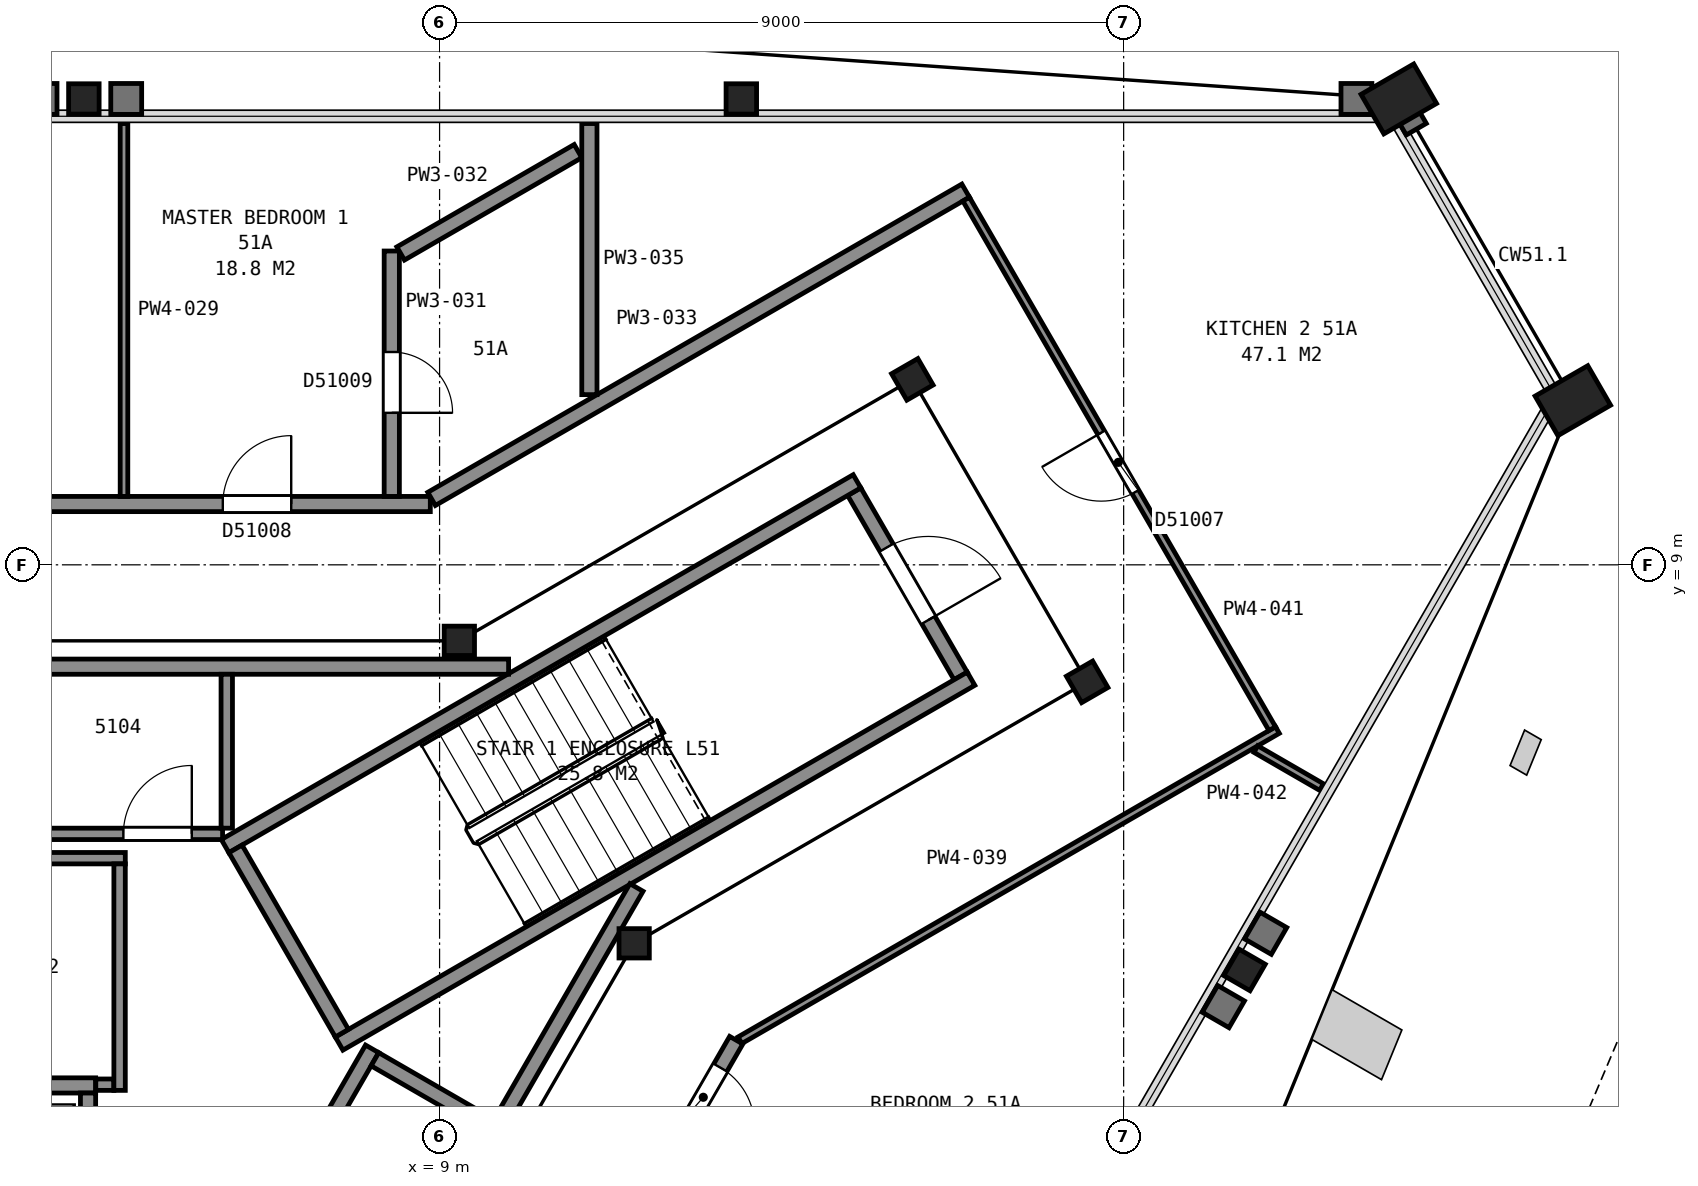
"""IFC4 building model, lengths in metres.
Left out: names, types, materials, properties, quantities, classifications, styles, units other than length and angle.
Written with IfcOpenShell. Run it as: python <this file> out.ifc"""

import sys

from ifc_helpers import new_model, si_unit, direction, frame, frame_2d, origin, origin_2d, place, context, subcontext, project, spatial, rectangle, hollow_rectangle, i_section, extrude, element, fill, save


model = new_model("IFC4")
c1 = context("Model", 3, precision=1e-05, world=origin(), true_north=direction((0.0, 1.0)))
c2 = subcontext(c1, "Body", "Model", "MODEL_VIEW")
j1 = project(units=[si_unit("LENGTHUNIT", "METRE"), si_unit("PLANEANGLEUNIT", "RADIAN")], contexts=[c1])
p1 = place(None, origin())
s1 = spatial("IfcSite", under=j1, at=p1, CompositionType="ELEMENT")
p2 = place(p1, origin())
s2 = spatial("IfcBuilding", under=s1, at=p2, CompositionType="ELEMENT")
p3 = place(p2, frame((0.0, 0.0, 206.4)))
s3 = spatial("IfcBuildingStorey", under=s2, at=p3, CompositionType="ELEMENT", Elevation=206.4)
p4 = place(p3, frame((21.62, 15.13, 0.0), z_axis=(0.0, 0.0, 1.0), x_axis=(0.5, -0.866025403784, 0.0)))
e1 = element("IfcColumn", 1, at=p4, inside=s3, PredefinedType="COLUMN", context=c2, shape_type="SweptSolid", body=[
    extrude(hollow_rectangle(XDim=0.6, YDim=0.8, WallThickness=0.05, at=origin_2d()), origin(), (0.0, 0.0, 1.0), 3.7),
])
for number, where, z_axis, x_axis in (
    (2, (12.97, 15.13, 0.0), (0.0, 0.0, 1.0), (1.0, 0.0, 0.0)),
    (3, (4.32, 15.13, 0.0), (0.0, 0.0, 1.0), (1.0, 0.0, 0.0)),
    (4, (19.59, 3.67, 0.0), (0.0, 0.0, 1.0), (-0.5, -0.866, 0.0)),
):
    element("IfcColumn", number, at=place(p3, frame(where, z_axis=z_axis, x_axis=x_axis)), inside=s3, PredefinedType="COLUMN", context=c2, shape_type="SweptSolid", body=[
        extrude(i_section(OverallWidth=0.401, OverallDepth=0.399, WebThickness=0.025, FlangeThickness=0.04, FilletRadius=0.015, at=origin_2d()), origin(), (0.0, 0.0, 1.0), 3.7),
    ])
p5 = place(p3, frame((23.91, 11.16, 0.0), z_axis=(0.0, 0.0, 1.0), x_axis=(0.5, -0.866025403784, 0.0)))
e5 = element("IfcColumn", 5, at=p5, inside=s3, PredefinedType="COLUMN", context=c2, shape_type="SweptSolid", body=[
    extrude(hollow_rectangle(XDim=0.6, YDim=0.8, WallThickness=0.05, at=origin_2d()), origin(), (0.0, 0.0, 1.0), 3.7),
])
p6 = place(p3, frame((11.56, 4.02, 0.0), z_axis=(0.0, 0.0, 1.0), x_axis=(1.0, 0.0, 0.0)))
e6 = element("IfcColumn", 6, at=p6, inside=s3, PredefinedType="COLUMN", context=c2, shape_type="SweptSolid", body=[
    extrude(i_section(OverallWidth=0.399, OverallDepth=0.386, WebThickness=0.021, FlangeThickness=0.033, FilletRadius=0.015, at=origin_2d()), origin(), (0.0, 0.0, 1.0), 3.7),
])
for number, where, z_axis, x_axis in (
    (7, (17.52, 7.46, 0.0), (0.0, 0.0, 1.0), (0.5, -0.866, 0.0)),
    (8, (15.22, 11.44, 0.0), (0.0, 0.0, 1.0), (0.5, -0.866, 0.0)),
):
    element("IfcColumn", number, at=place(p3, frame(where, z_axis=z_axis, x_axis=x_axis)), inside=s3, PredefinedType="COLUMN", context=c2, shape_type="SweptSolid", body=[
        extrude(i_section(OverallWidth=0.401, OverallDepth=0.399, WebThickness=0.025, FlangeThickness=0.04, FilletRadius=0.015, at=origin_2d()), origin(), (0.0, 0.0, 1.0), 3.7),
    ])
p7 = place(p3, frame((9.26, 8.0, 0.0), z_axis=(0.0, 0.0, 1.0), x_axis=(1.0, 0.0, 0.0)))
e9 = element("IfcColumn", 9, at=p7, inside=s3, PredefinedType="COLUMN", context=c2, shape_type="SweptSolid", body=[
    extrude(i_section(OverallWidth=0.399, OverallDepth=0.386, WebThickness=0.021, FlangeThickness=0.033, FilletRadius=0.015, at=origin_2d()), origin(), (0.0, 0.0, 1.0), 3.7),
])
p8 = place(p3, frame((15.855, 7.538, 0.0), z_axis=(0.0, 0.0, 1.0), x_axis=(-0.500049511043, 0.865996816683, 0.0)))
e10 = element("IfcWall", 10, at=p8, inside=s3, PredefinedType="PARTITIONING", context=c2, shape_type="SweptSolid", body=[
    extrude(rectangle(XDim=2.8, YDim=0.2, at=frame_2d((1.4, 0.0))), origin(), (0.0, 0.0, 1.0), 3.45),
])
p9 = place(p8, frame((0.85, 0.0, 0.0)))
e11 = element("IfcOpeningElement", 11, at=p9, cuts=e10, PredefinedType="OPENING", context=c2, shape_type="SweptSolid", body=[
    extrude(rectangle(XDim=1.1, YDim=2.1, at=frame_2d((0.55, 1.05))), frame((0.0, 0.11, 0.0), z_axis=(0.0, -1.0, 0.0), x_axis=(1.0, 0.0, 0.0)), (0.0, 0.0, 1.0), 0.22),
])
for number, where, z_axis, x_axis in (
    (12, (6.178, 5.299, 0.0), (0.0, 0.0, 1.0), (0.866, 0.5, 0.0)),
    (13, (7.678, 2.701, 0.0), (0.0, 0.0, 1.0), (0.866, 0.5, 0.0)),
):
    element("IfcWall", number, at=place(p3, frame(where, z_axis=z_axis, x_axis=x_axis)), inside=s3, PredefinedType="PARTITIONING", context=c2, shape_type="SweptSolid", body=[
        extrude(rectangle(XDim=9.6, YDim=0.2, at=frame_2d((4.8, 0.0))), origin(), (0.0, 0.0, 1.0), 3.45),
    ])
p10 = place(p3, frame((7.715, 2.838, 0.0), z_axis=(0.0, 0.0, 1.0), x_axis=(-0.500049511043, 0.865996816683, 0.0)))
e14 = element("IfcWall", 14, at=p10, inside=s3, PredefinedType="PARTITIONING", context=c2, shape_type="SweptSolid", body=[
    extrude(rectangle(XDim=2.8, YDim=0.2, at=frame_2d((1.4, 0.0))), origin(), (0.0, 0.0, 1.0), 3.45),
])
p11 = place(p3, frame((1.525, 2.15, 0.0), z_axis=(0.0, 0.0, 1.0), x_axis=(1.0, 0.0, 0.0)))
e15 = element("IfcWall", 15, at=p11, inside=s3, PredefinedType="PARTITIONING", context=c2, shape_type="SweptSolid", body=[
    extrude(rectangle(XDim=2.95, YDim=0.2, at=frame_2d((1.475, 0.0))), origin(), (0.0, 0.0, 1.0), 3.7),
])
p12 = place(p11, frame((0.925, 0.0, 0.0)))
e16 = element("IfcOpeningElement", 16, at=p12, cuts=e15, PredefinedType="OPENING", context=c2, shape_type="SweptSolid", body=[
    extrude(rectangle(XDim=1.1, YDim=2.1, at=frame_2d((0.55, 1.05))), frame((0.0, 0.11, 0.0), z_axis=(0.0, -1.0, 0.0), x_axis=(1.0, 0.0, 0.0)), (0.0, 0.0, 1.0), 0.22),
])
p13 = place(p3, frame((5.663, -1.612, 0.0), z_axis=(0.0, 0.0, 1.0), x_axis=(0.49998122708, 0.866036242063, 0.0)))
e17 = element("IfcWall", 17, at=p13, inside=s3, PredefinedType="PARTITIONING", context=c2, shape_type="SweptSolid", body=[
    extrude(rectangle(XDim=4.9, YDim=0.2, at=frame_2d((2.45, 0.0))), origin(), (0.0, 0.0, 1.0), 3.7),
])
p14 = place(p3, frame((4.375, 0.1, 0.0), z_axis=(0.0, 0.0, 1.0), x_axis=(0.0, 1.0, 0.0)))
e18 = element("IfcWall", 18, at=p14, inside=s3, PredefinedType="PARTITIONING", context=c2, shape_type="SweptSolid", body=[
    extrude(rectangle(XDim=1.95, YDim=0.2, at=frame_2d((0.975, 0.0))), origin(), (0.0, 0.0, 1.0), 3.7),
])
p15 = place(p3, frame((9.665, 1.62, 0.0), z_axis=(0.0, 0.0, 1.0), x_axis=(-0.866002029911, 0.500040482552, 0.0)))
e19 = element("IfcWall", 19, at=p15, inside=s3, PredefinedType="PARTITIONING", context=c2, shape_type="SweptSolid", body=[
    extrude(rectangle(XDim=1.75, YDim=0.2, at=frame_2d((0.875, 0.0))), origin(), (0.0, 0.0, 1.0), 3.7),
])
p16 = place(p3, frame((-3.933, 7.66, 0.0), z_axis=(0.0, 0.0, 1.0), x_axis=(1.0, 0.0, 0.0)))
e20 = element("IfcWall", 20, at=p16, inside=s3, PredefinedType="PARTITIONING", context=c2, shape_type="SweptSolid", body=[
    extrude(rectangle(XDim=13.841, YDim=0.2, at=frame_2d((6.92, 0.0))), origin(), (0.0, 0.0, 1.0), 3.45),
])
p17 = place(p3, frame((-0.245, 5.14, 0.0), z_axis=(0.0, 0.0, 1.0), x_axis=(1.0, 0.0, 0.0)))
e21 = element("IfcWall", 21, at=p17, inside=s3, PredefinedType="PARTITIONING", context=c2, shape_type="SweptSolid", body=[
    extrude(rectangle(XDim=5.11, YDim=0.15, at=frame_2d((2.555, 0.0))), origin(), (0.0, 0.0, 1.0), 3.45),
])
p18 = place(p17, frame((0.175, 0.0, 0.0)))
e22 = element("IfcOpeningElement", 22, at=p18, cuts=e21, PredefinedType="OPENING", context=c2, shape_type="SweptSolid", body=[
    extrude(rectangle(XDim=1.0, YDim=2.1, at=frame_2d((0.5, 1.05))), frame((0.0, 0.085, 0.0), z_axis=(0.0, -1.0, 0.0), x_axis=(1.0, 0.0, 0.0)), (0.0, 0.0, 1.0), 0.17),
])
p19 = place(p3, frame((0.925, 5.46, 0.0), z_axis=(0.0, 0.0, 1.0), x_axis=(1.0, 0.0, 0.0)))
e23 = element("IfcWall", 23, at=p19, inside=s3, PredefinedType="PARTITIONING", context=c2, shape_type="SweptSolid", body=[
    extrude(rectangle(XDim=5.22, YDim=0.15, at=frame_2d((2.61, 0.0))), origin(), (0.0, 0.0, 1.0), 3.45),
])
p20 = place(p19, frame((3.915, 0.0, 0.0)))
e24 = element("IfcOpeningElement", 24, at=p20, cuts=e23, PredefinedType="OPENING", context=c2, shape_type="SweptSolid", body=[
    extrude(rectangle(XDim=0.9, YDim=2.1, at=frame_2d((0.45, 1.05))), frame((0.0, 0.085, 0.0), z_axis=(0.0, -1.0, 0.0), x_axis=(1.0, 0.0, 0.0)), (0.0, 0.0, 1.0), 0.17),
])
p21 = place(p3, frame((4.477, 2.16, 0.0), z_axis=(0.0, 0.0, 1.0), x_axis=(1.0, 0.0, 0.0)))
e25 = element("IfcWall", 25, at=p21, inside=s3, PredefinedType="PARTITIONING", context=c2, shape_type="SweptSolid", body=[
    extrude(rectangle(XDim=0.238, YDim=0.15, at=frame_2d((0.119, 0.0))), origin(), (0.0, 0.0, 1.0), 3.45),
])
p22 = place(p3, frame((4.79, 2.085, 0.0), z_axis=(0.0, 0.0, 1.0), x_axis=(0.0, 1.0, 0.0)))
e26 = element("IfcWall", 26, at=p22, inside=s3, PredefinedType="PARTITIONING", context=c2, shape_type="SweptSolid", body=[
    extrude(rectangle(XDim=2.98, YDim=0.15, at=frame_2d((1.49, 0.0))), origin(), (0.0, 0.0, 1.0), 3.45),
])
p23 = place(p3, frame((6.2, 5.535, 0.0), z_axis=(0.0, 0.0, 1.0), x_axis=(0.0, 1.0, 0.0)))
e27 = element("IfcWall", 27, at=p23, inside=s3, PredefinedType="PARTITIONING", context=c2, shape_type="SweptSolid", body=[
    extrude(rectangle(XDim=2.025, YDim=0.15, at=frame_2d((1.013, 0.0))), origin(), (0.0, 0.0, 1.0), 3.45),
])
p24 = place(p3, frame((9.803, 1.658, 0.0), z_axis=(0.0, 0.0, 1.0), x_axis=(0.499943114462, 0.866058244174, 0.0)))
e28 = element("IfcWall", 28, at=p24, inside=s3, PredefinedType="PARTITIONING", context=c2, shape_type="SweptSolid", body=[
    extrude(rectangle(XDim=3.576, YDim=0.2, at=frame_2d((1.788, 0.0))), origin(), (0.0, 0.0, 1.0), 3.45),
])
p25 = place(p3, frame((-8.828, 9.8, 0.0), z_axis=(0.0, 0.0, 1.0), x_axis=(1.0, 0.0, 0.0)))
e29 = element("IfcWall", 29, at=p25, inside=s3, PredefinedType="PARTITIONING", context=c2, shape_type="SweptSolid", body=[
    extrude(rectangle(XDim=17.706, YDim=0.2, at=frame_2d((8.853, 0.0))), origin(), (0.0, 0.0, 1.0), 2.713),
])
p26 = place(p25, frame((14.976, 0.0, 0.0)))
e30 = element("IfcOpeningElement", 30, at=p26, cuts=e29, PredefinedType="OPENING", context=c2, shape_type="SweptSolid", body=[
    extrude(rectangle(XDim=0.9, YDim=2.1, at=frame_2d((0.45, 1.05))), frame((0.0, 0.11, 0.0), z_axis=(0.0, -1.0, 0.0), x_axis=(1.0, 0.0, 0.0)), (0.0, 0.0, 1.0), 0.22),
])
p27 = place(p25, frame((10.673, 0.0, 0.0)))
e31 = element("IfcOpeningElement", 31, at=p27, cuts=e29, PredefinedType="OPENING", context=c2, shape_type="SweptSolid", body=[
    extrude(rectangle(XDim=0.9, YDim=2.1, at=frame_2d((0.45, 1.05))), frame((0.0, 0.11, 0.0), z_axis=(0.0, -1.0, 0.0), x_axis=(1.0, 0.0, 0.0)), (0.0, 0.0, 1.0), 0.22),
])
p28 = place(p25, frame((5.57, 0.0, 0.0)))
e32 = element("IfcOpeningElement", 32, at=p28, cuts=e29, PredefinedType="OPENING", context=c2, shape_type="SweptSolid", body=[
    extrude(rectangle(XDim=0.9, YDim=2.1, at=frame_2d((0.45, 1.05))), frame((0.0, 0.11, 0.0), z_axis=(0.0, -1.0, 0.0), x_axis=(1.0, 0.0, 0.0)), (0.0, 0.0, 1.0), 0.22),
])
p29 = place(p25, frame((1.3, 0.0, 0.0)))
e33 = element("IfcOpeningElement", 33, at=p29, cuts=e29, PredefinedType="OPENING", context=c2, shape_type="SweptSolid", body=[
    extrude(rectangle(XDim=0.9, YDim=2.1, at=frame_2d((0.45, 1.05))), frame((0.0, 0.11, 0.0), z_axis=(0.0, -1.0, 0.0), x_axis=(1.0, 0.0, 0.0)), (0.0, 0.0, 1.0), 0.22),
])
p30 = place(p3, frame((12.903, 2.745, 0.0), z_axis=(0.0, 0.0, 1.0), x_axis=(-0.499999743747, -0.866025551732, 0.0)))
e34 = element("IfcWall", 34, at=p30, inside=s3, PredefinedType="PARTITIONING", context=c2, shape_type="SweptSolid", body=[
    extrude(rectangle(XDim=17.656, YDim=0.2, at=frame_2d((8.828, 0.0))), origin(), (0.0, 0.0, 1.0), 2.713),
])
p31 = place(p30, frame((12.756, 0.0, 0.0)))
e35 = element("IfcOpeningElement", 35, at=p31, cuts=e34, PredefinedType="OPENING", context=c2, shape_type="SweptSolid", body=[
    extrude(rectangle(XDim=1.2, YDim=2.1, at=frame_2d((0.6, 1.05))), frame((0.0, 0.11, 0.0), z_axis=(0.0, -1.0, 0.0), x_axis=(1.0, 0.0, 0.0)), (0.0, 0.0, 1.0), 0.22),
])
p32 = place(p30, frame((7.044, 0.0, 0.0)))
e36 = element("IfcOpeningElement", 36, at=p32, cuts=e34, PredefinedType="OPENING", context=c2, shape_type="SweptSolid", body=[
    extrude(rectangle(XDim=0.9, YDim=2.1, at=frame_2d((0.45, 1.05))), frame((0.0, 0.11, 0.0), z_axis=(0.0, -1.0, 0.0), x_axis=(1.0, 0.0, 0.0)), (0.0, 0.0, 1.0), 0.22),
])
p33 = place(p30, frame((0.417, 0.0, 0.0)))
e37 = element("IfcOpeningElement", 37, at=p33, cuts=e34, PredefinedType="OPENING", context=c2, shape_type="SweptSolid", body=[
    extrude(rectangle(XDim=0.9, YDim=2.1, at=frame_2d((0.45, 1.05))), frame((0.0, 0.11, 0.0), z_axis=(0.0, -1.0, 0.0), x_axis=(1.0, 0.0, 0.0)), (0.0, 0.0, 1.0), 0.22),
])
p34 = place(p3, frame((4.848, 9.9, 0.0), z_axis=(0.0, 0.0, 1.0), x_axis=(0.0, 1.0, 0.0)))
e38 = element("IfcWall", 38, at=p34, inside=s3, PredefinedType="PARTITIONING", context=c2, shape_type="SweptSolid", body=[
    extrude(rectangle(XDim=4.906, YDim=0.1, at=frame_2d((2.453, 0.0))), origin(), (0.0, 0.0, 1.0), 2.713),
])
p35 = place(p3, frame((8.371, 13.129, 0.0), z_axis=(0.0, 0.0, 1.0), x_axis=(0.0, -1.0, 0.0)))
e39 = element("IfcWall", 39, at=p35, inside=s3, PredefinedType="PARTITIONING", context=c2, shape_type="SweptSolid", body=[
    extrude(rectangle(XDim=3.229, YDim=0.2, at=frame_2d((1.615, 0.0))), origin(), (0.0, 0.0, 1.0), 2.713),
])
p36 = place(p35, frame((1.329, 0.0, 0.0)))
e40 = element("IfcOpeningElement", 40, at=p36, cuts=e39, PredefinedType="OPENING", context=c2, shape_type="SweptSolid", body=[
    extrude(rectangle(XDim=0.8, YDim=2.1, at=frame_2d((0.4, 1.05))), frame((0.0, 0.11, 0.0), z_axis=(0.0, -1.0, 0.0), x_axis=(1.0, 0.0, 0.0)), (0.0, 0.0, 1.0), 0.22),
])
p37 = place(p3, frame((8.488, 13.096, 0.0), z_axis=(0.0, 0.0, 1.0), x_axis=(0.866031650062, 0.499989180974, 0.0)))
e41 = element("IfcWall", 41, at=p37, inside=s3, PredefinedType="PARTITIONING", context=c2, shape_type="SweptSolid", body=[
    extrude(rectangle(XDim=2.694, YDim=0.2, at=frame_2d((1.347, 0.0))), origin(), (0.0, 0.0, 1.0), 2.713),
])
p38 = place(p3, frame((8.895, 9.867, 0.0), z_axis=(0.0, 0.0, 1.0), x_axis=(0.866079355551, 0.499906541154, 0.0)))
e42 = element("IfcWall", 42, at=p38, inside=s3, PredefinedType="PARTITIONING", context=c2, shape_type="SweptSolid", body=[
    extrude(rectangle(XDim=8.113, YDim=0.2, at=frame_2d((4.056, 0.0))), origin(), (0.0, 0.0, 1.0), 2.713),
])
p39 = place(p3, frame((10.971, 11.239, 0.0), z_axis=(0.0, 0.0, 1.0), x_axis=(0.0, 1.0, 0.0)))
e43 = element("IfcWall", 43, at=p39, inside=s3, PredefinedType="PARTITIONING", context=c2, shape_type="SweptSolid", body=[
    extrude(rectangle(XDim=3.567, YDim=0.2, at=frame_2d((1.783, 0.0))), origin(), (0.0, 0.0, 1.0), 2.713),
])
p40 = place(p3, frame((12.952, 2.744, 0.0), z_axis=(0.0, 0.0, 1.0), x_axis=(0.86608949446, 0.499888975259, 0.0)))
e44 = element("IfcWall", 44, at=p40, inside=s3, PredefinedType="PARTITIONING", context=c2, shape_type="SweptSolid", body=[
    extrude(rectangle(XDim=8.165, YDim=0.1, at=frame_2d((4.083, 0.0))), origin(), (0.0, 0.0, 1.0), 2.713),
])
p41 = place(p3, frame((15.928, 13.812, 0.0), z_axis=(0.0, 0.0, 1.0), x_axis=(0.500422653123, -0.865781247337, 0.0)))
e45 = element("IfcWall", 45, at=p41, inside=s3, PredefinedType="PARTITIONING", context=c2, shape_type="SweptSolid", body=[
    extrude(rectangle(XDim=8.047, YDim=0.1, at=frame_2d((4.024, 0.0))), origin(), (0.0, 0.0, 1.0), 2.713),
])
p42 = place(p41, frame((3.55, 0.0, 0.0)))
e46 = element("IfcOpeningElement", 46, at=p42, cuts=e45, PredefinedType="OPENING", context=c2, shape_type="SweptSolid", body=[
    extrude(rectangle(XDim=0.9, YDim=2.1, at=frame_2d((0.45, 1.05))), frame((0.0, 0.06, 0.0), z_axis=(0.0, -1.0, 0.0), x_axis=(1.0, 0.0, 0.0)), (0.0, 0.0, 1.0), 0.12),
])
p43 = place(p3, frame((19.739, 6.576, 0.0), z_axis=(0.0, 0.0, 1.0), x_axis=(0.865855657918, -0.500293893279, 0.0)))
e47 = element("IfcWall", 47, at=p43, inside=s3, PredefinedType="PARTITIONING", context=c2, shape_type="SweptSolid", body=[
    extrude(rectangle(XDim=0.999, YDim=0.1, at=frame_2d((0.499, 0.0))), origin(), (0.0, 0.0, 1.0), 2.713),
])
p44 = place(p9, origin())
e48 = element("IfcDoor", 48, at=p44, inside=s3, OperationType="SINGLE_SWING_LEFT", PredefinedType="DOOR", context=c2, shape_type="SweptSolid", body=[
    extrude(rectangle(XDim=1.1, YDim=2.1, at=frame_2d((0.55, 1.05))), frame((0.0, 0.025, 0.0), z_axis=(0.0, -1.0, 0.0), x_axis=(1.0, 0.0, 0.0)), (0.0, 0.0, 1.0), 0.05),
])
fill(e11, e48)
p45 = place(p20, origin())
e49 = element("IfcDoor", 49, at=p45, inside=s3, OperationType="SINGLE_SWING_RIGHT", PredefinedType="DOOR", context=c2, shape_type="SweptSolid", body=[
    extrude(rectangle(XDim=0.9, YDim=2.1, at=frame_2d((0.45, 1.05))), frame((0.0, 0.025, 0.0), z_axis=(0.0, -1.0, 0.0), x_axis=(1.0, 0.0, 0.0)), (0.0, 0.0, 1.0), 0.05),
])
fill(e24, e49)
p46 = place(p26, origin())
e50 = element("IfcDoor", 50, at=p46, inside=s3, OperationType="SINGLE_SWING_RIGHT", PredefinedType="DOOR", context=c2, shape_type="SweptSolid", body=[
    extrude(rectangle(XDim=0.9, YDim=2.1, at=frame_2d((0.45, 1.05))), frame((0.0, 0.025, 0.0), z_axis=(0.0, -1.0, 0.0), x_axis=(1.0, 0.0, 0.0)), (0.0, 0.0, 1.0), 0.05),
])
fill(e30, e50)
p47 = place(p33, origin())
e51 = element("IfcDoor", 51, at=p47, inside=s3, OperationType="SINGLE_SWING_RIGHT", PredefinedType="DOOR", context=c2, shape_type="SweptSolid", body=[
    extrude(rectangle(XDim=0.9, YDim=2.1, at=frame_2d((0.45, 1.05))), frame((0.0, 0.025, 0.0), z_axis=(0.0, -1.0, 0.0), x_axis=(1.0, 0.0, 0.0)), (0.0, 0.0, 1.0), 0.05),
])
fill(e37, e51)
p48 = place(p36, origin())
e52 = element("IfcDoor", 52, at=p48, inside=s3, OperationType="SINGLE_SWING_RIGHT", PredefinedType="DOOR", context=c2, shape_type="SweptSolid", body=[
    extrude(rectangle(XDim=0.8, YDim=2.1, at=frame_2d((0.4, 1.05))), frame((0.0, 0.025, 0.0), z_axis=(0.0, -1.0, 0.0), x_axis=(1.0, 0.0, 0.0)), (0.0, 0.0, 1.0), 0.05),
])
fill(e40, e52)
p49 = place(p42, origin())
e53 = element("IfcDoor", 53, at=p49, inside=s3, OperationType="SINGLE_SWING_LEFT", PredefinedType="DOOR", context=c2, shape_type="SweptSolid", body=[
    extrude(rectangle(XDim=0.9, YDim=2.1, at=frame_2d((0.45, 1.05))), frame((0.0, 0.025, 0.0), z_axis=(0.0, -1.0, 0.0), x_axis=(1.0, 0.0, 0.0)), (0.0, 0.0, 1.0), 0.05),
])
fill(e46, e53)
save(model, sys.argv[1])
